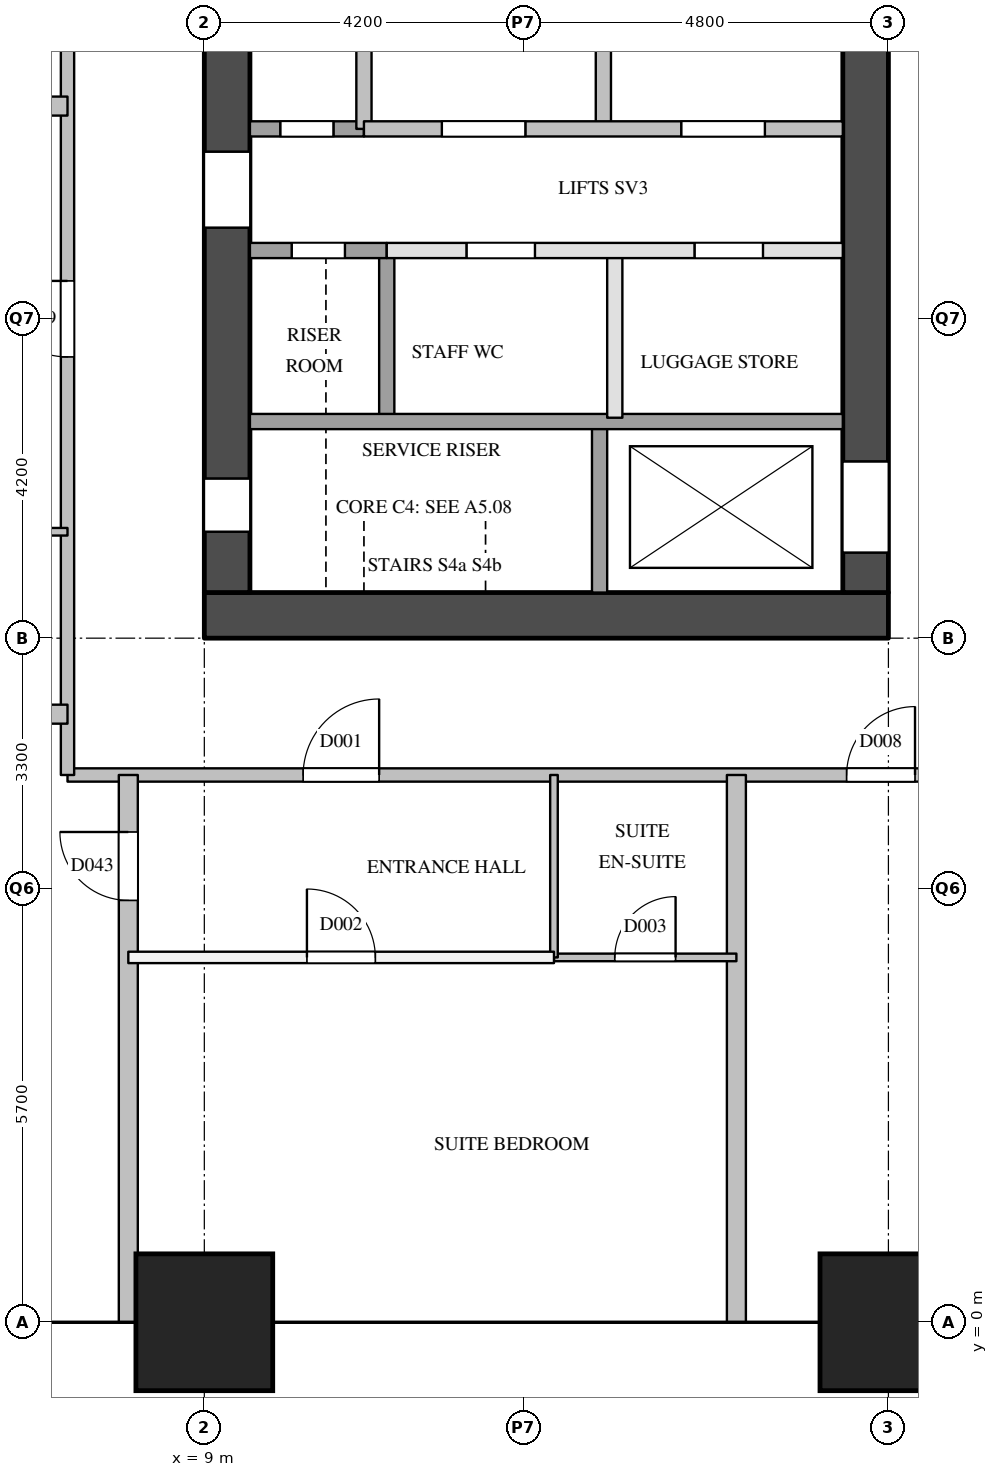
"""IFC4 building model, lengths in metres.
Left out: names, types, materials, properties, quantities, classifications, styles, units other than length and angle.
Written with IfcOpenShell. Run it as: python <this file> out.ifc"""

import sys

from ifc_helpers import new_model, si_unit, direction, frame, frame_2d, origin, origin_2d, place, context, subcontext, project, spatial, rectangle, extrude, element, fill, save


model = new_model("IFC4")
c1 = context("Model", 3, precision=1e-05, world=origin(), true_north=direction((0.0, 1.0)))
c2 = subcontext(c1, "Body", "Model", "MODEL_VIEW")
j1 = project(units=[si_unit("LENGTHUNIT", "METRE"), si_unit("PLANEANGLEUNIT", "RADIAN")], contexts=[c1])
p1 = place(None, origin())
s1 = spatial("IfcSite", under=j1, at=p1, CompositionType="ELEMENT")
p2 = place(p1, origin())
s2 = spatial("IfcBuilding", under=s1, at=p2, CompositionType="ELEMENT")
p3 = place(p2, frame((0.0, 0.0, 34.8)))
s3 = spatial("IfcBuildingStorey", under=s2, at=p3, CompositionType="ELEMENT", Elevation=34.8)
for number, where, z_axis, x_axis in (
    (1, (9.0, 0.0, 0.0), (0.0, 0.0, 1.0), (1.0, 0.0, 0.0)),
    (2, (18.0, 0.0, 0.0), (0.0, 0.0, 1.0), (1.0, 0.0, 0.0)),
):
    element("IfcColumn", number, at=place(p3, frame(where, z_axis=z_axis, x_axis=x_axis)), inside=s3, PredefinedType="COLUMN", context=c2, shape_type="SweptSolid", body=[
        extrude(rectangle(XDim=1.8, YDim=1.8, at=origin_2d()), origin(), (0.0, 0.0, 1.0), 3.8),
    ])
p4 = place(p3, frame((9.0, 9.3, 0.0), z_axis=(0.0, 0.0, 1.0), x_axis=(1.0, 0.0, 0.0)))
e3 = element("IfcWall", 3, at=p4, inside=s3, PredefinedType="SHEAR", context=c2, shape_type="SweptSolid", body=[
    extrude(rectangle(XDim=9.0, YDim=0.6, at=frame_2d((4.5, 0.0))), origin(), (0.0, 0.0, 1.0), 3.5),
])
p5 = place(p3, frame((9.3, 9.6, 0.0), z_axis=(0.0, 0.0, 1.0), x_axis=(0.0, 1.0, 0.0)))
e4 = element("IfcWall", 4, at=p5, inside=s3, PredefinedType="SHEAR", context=c2, shape_type="SweptSolid", body=[
    extrude(rectangle(XDim=12.3, YDim=0.6, at=frame_2d((6.15, 0.0))), origin(), (0.0, 0.0, 1.0), 3.5),
])
p6 = place(p5, frame((0.8, 0.0, 0.0)))
e5 = element("IfcOpeningElement", 5, at=p6, cuts=e4, PredefinedType="OPENING", context=c2, shape_type="SweptSolid", body=[
    extrude(rectangle(XDim=0.7, YDim=2.1, at=frame_2d((0.35, 1.05))), frame((0.0, 0.31, 0.0), z_axis=(0.0, -1.0, 0.0), x_axis=(1.0, 0.0, 0.0)), (0.0, 0.0, 1.0), 0.62),
])
p7 = place(p5, frame((4.8, 0.0, 0.0)))
e6 = element("IfcOpeningElement", 6, at=p7, cuts=e4, PredefinedType="OPENING", context=c2, shape_type="SweptSolid", body=[
    extrude(rectangle(XDim=1.0, YDim=2.1, at=frame_2d((0.5, 1.05))), frame((0.0, 0.31, 0.0), z_axis=(0.0, -1.0, 0.0), x_axis=(1.0, 0.0, 0.0)), (0.0, 0.0, 1.0), 0.62),
])
p8 = place(p3, frame((17.7, 9.6, 0.0), z_axis=(0.0, 0.0, 1.0), x_axis=(0.0, 1.0, 0.0)))
e7 = element("IfcWall", 7, at=p8, inside=s3, PredefinedType="SHEAR", context=c2, shape_type="SweptSolid", body=[
    extrude(rectangle(XDim=12.3, YDim=0.6, at=frame_2d((6.15, 0.0))), origin(), (0.0, 0.0, 1.0), 3.5),
])
p9 = place(p8, frame((0.525, 0.0, 0.0)))
e8 = element("IfcOpeningElement", 8, at=p9, cuts=e7, PredefinedType="OPENING", context=c2, shape_type="SweptSolid", body=[
    extrude(rectangle(XDim=1.2, YDim=2.1, at=frame_2d((0.6, 1.05))), frame((0.0, 0.31, 0.0), z_axis=(0.0, -1.0, 0.0), x_axis=(1.0, 0.0, 0.0)), (0.0, 0.0, 1.0), 0.62),
])
p10 = place(p3, frame((11.1, 15.7, 0.0), z_axis=(0.0, 0.0, 1.0), x_axis=(0.0, 1.0, 0.0)))
e9 = element("IfcWall", 9, at=p10, inside=s3, PredefinedType="SOLIDWALL", context=c2, shape_type="SweptSolid", body=[
    extrude(rectangle(XDim=4.3, YDim=0.2, at=frame_2d((2.15, 0.0))), origin(), (0.0, 0.0, 1.0), 3.5),
])
p11 = place(p3, frame((11.4, 11.9, 0.0), z_axis=(0.0, 0.0, 1.0), x_axis=(0.0, 1.0, 0.0)))
e10 = element("IfcWall", 10, at=p11, inside=s3, PredefinedType="SOLIDWALL", context=c2, shape_type="SweptSolid", body=[
    extrude(rectangle(XDim=2.2, YDim=0.2, at=frame_2d((1.1, 0.0))), origin(), (0.0, 0.0, 1.0), 3.5),
])
p12 = place(p3, frame((14.2, 9.6, 0.0), z_axis=(0.0, 0.0, 1.0), x_axis=(0.0, 1.0, 0.0)))
e11 = element("IfcWall", 11, at=p12, inside=s3, PredefinedType="SOLIDWALL", context=c2, shape_type="SweptSolid", body=[
    extrude(rectangle(XDim=2.3, YDim=0.2, at=frame_2d((1.15, 0.0))), origin(), (0.0, 0.0, 1.0), 3.5),
])
p13 = place(p3, frame((14.25, 15.7, 0.0), z_axis=(0.0, 0.0, 1.0), x_axis=(0.0, 1.0, 0.0)))
e12 = element("IfcWall", 12, at=p13, inside=s3, PredefinedType="SOLIDWALL", context=c2, shape_type="SweptSolid", body=[
    extrude(rectangle(XDim=4.3, YDim=0.2, at=frame_2d((2.15, 0.0))), origin(), (0.0, 0.0, 1.0), 3.5),
])
p14 = place(p3, frame((14.4, 11.9, 0.0), z_axis=(0.0, 0.0, 1.0), x_axis=(0.0, 1.0, 0.0)))
e13 = element("IfcWall", 13, at=p14, inside=s3, PredefinedType="PARTITIONING", context=c2, shape_type="SweptSolid", body=[
    extrude(rectangle(XDim=2.2, YDim=0.2, at=frame_2d((1.1, 0.0))), origin(), (0.0, 0.0, 1.0), 3.5),
])
p15 = place(p3, frame((9.6, 11.85, 0.0), z_axis=(0.0, 0.0, 1.0), x_axis=(1.0, 0.0, 0.0)))
e14 = element("IfcWall", 14, at=p15, inside=s3, PredefinedType="SOLIDWALL", context=c2, shape_type="SweptSolid", body=[
    extrude(rectangle(XDim=7.8, YDim=0.2, at=frame_2d((3.9, 0.0))), origin(), (0.0, 0.0, 1.0), 3.5),
])
p16 = place(p3, frame((11.4, 14.1, 0.0), z_axis=(0.0, 0.0, 1.0), x_axis=(1.0, 0.0, 0.0)))
e15 = element("IfcWall", 15, at=p16, inside=s3, PredefinedType="PARTITIONING", context=c2, shape_type="SweptSolid", body=[
    extrude(rectangle(XDim=6.0, YDim=0.2, at=frame_2d((3.0, 0.0))), origin(), (0.0, 0.0, 1.0), 3.5),
])
p17 = place(p16, frame((1.05, 0.0, 0.0)))
e16 = element("IfcOpeningElement", 16, at=p17, cuts=e15, PredefinedType="OPENING", context=c2, shape_type="SweptSolid", body=[
    extrude(rectangle(XDim=0.9, YDim=2.1, at=frame_2d((0.45, 1.05))), frame((0.0, 0.11, 0.0), z_axis=(0.0, -1.0, 0.0), x_axis=(1.0, 0.0, 0.0)), (0.0, 0.0, 1.0), 0.22),
])
p18 = place(p16, frame((4.05, 0.0, 0.0)))
e17 = element("IfcOpeningElement", 17, at=p18, cuts=e15, PredefinedType="OPENING", context=c2, shape_type="SweptSolid", body=[
    extrude(rectangle(XDim=0.9, YDim=2.1, at=frame_2d((0.45, 1.05))), frame((0.0, 0.11, 0.0), z_axis=(0.0, -1.0, 0.0), x_axis=(1.0, 0.0, 0.0)), (0.0, 0.0, 1.0), 0.22),
])
p19 = place(p3, frame((9.6, 14.1, 0.0), z_axis=(0.0, 0.0, 1.0), x_axis=(1.0, 0.0, 0.0)))
e18 = element("IfcWall", 18, at=p19, inside=s3, PredefinedType="SOLIDWALL", context=c2, shape_type="SweptSolid", body=[
    extrude(rectangle(XDim=1.8, YDim=0.2, at=frame_2d((0.9, 0.0))), origin(), (0.0, 0.0, 1.0), 3.5),
])
p20 = place(p19, frame((0.55, 0.0, 0.0)))
e19 = element("IfcOpeningElement", 19, at=p20, cuts=e18, PredefinedType="OPENING", context=c2, shape_type="SweptSolid", body=[
    extrude(rectangle(XDim=0.7, YDim=2.1, at=frame_2d((0.35, 1.05))), frame((0.0, 0.11, 0.0), z_axis=(0.0, -1.0, 0.0), x_axis=(1.0, 0.0, 0.0)), (0.0, 0.0, 1.0), 0.22),
])
p21 = place(p3, frame((9.6, 15.7, 0.0), z_axis=(0.0, 0.0, 1.0), x_axis=(1.0, 0.0, 0.0)))
e20 = element("IfcWall", 20, at=p21, inside=s3, PredefinedType="SOLIDWALL", context=c2, shape_type="SweptSolid", body=[
    extrude(rectangle(XDim=1.5, YDim=0.2, at=frame_2d((0.75, 0.0))), origin(), (0.0, 0.0, 1.0), 3.5),
])
p22 = place(p21, frame((0.4, 0.0, 0.0)))
e21 = element("IfcOpeningElement", 21, at=p22, cuts=e20, PredefinedType="OPENING", context=c2, shape_type="SweptSolid", body=[
    extrude(rectangle(XDim=0.7, YDim=2.1, at=frame_2d((0.35, 1.05))), frame((0.0, 0.11, 0.0), z_axis=(0.0, -1.0, 0.0), x_axis=(1.0, 0.0, 0.0)), (0.0, 0.0, 1.0), 0.22),
])
p23 = place(p3, frame((11.1, 15.7, 0.0), z_axis=(0.0, 0.0, 1.0), x_axis=(1.0, 0.0, 0.0)))
e22 = element("IfcWall", 22, at=p23, inside=s3, PredefinedType="SOLIDWALL", context=c2, shape_type="SweptSolid", body=[
    extrude(rectangle(XDim=6.3, YDim=0.2, at=frame_2d((3.15, 0.0))), origin(), (0.0, 0.0, 1.0), 3.5),
])
p24 = place(p23, frame((4.175, 0.0, 0.0)))
e23 = element("IfcOpeningElement", 23, at=p24, cuts=e22, PredefinedType="OPENING", context=c2, shape_type="SweptSolid", body=[
    extrude(rectangle(XDim=1.1, YDim=2.1, at=frame_2d((0.55, 1.05))), frame((0.0, 0.11, 0.0), z_axis=(0.0, -1.0, 0.0), x_axis=(1.0, 0.0, 0.0)), (0.0, 0.0, 1.0), 0.22),
])
p25 = place(p23, frame((1.025, 0.0, 0.0)))
e24 = element("IfcOpeningElement", 24, at=p25, cuts=e22, PredefinedType="OPENING", context=c2, shape_type="SweptSolid", body=[
    extrude(rectangle(XDim=1.1, YDim=2.1, at=frame_2d((0.55, 1.05))), frame((0.0, 0.11, 0.0), z_axis=(0.0, -1.0, 0.0), x_axis=(1.0, 0.0, 0.0)), (0.0, 0.0, 1.0), 0.22),
])
p26 = place(p3, frame((7.2, 7.2, 0.0), z_axis=(0.0, 0.0, 1.0), x_axis=(1.0, 0.0, 0.0)))
e25 = element("IfcWall", 25, at=p26, inside=s3, PredefinedType="PARTITIONING", context=c2, shape_type="SweptSolid", body=[
    extrude(rectangle(XDim=12.6, YDim=0.175, at=frame_2d((6.3, 0.0))), origin(), (0.0, 0.0, 1.0), 3.5),
])
p27 = place(p26, frame((3.1, 0.0, 0.0)))
e26 = element("IfcOpeningElement", 26, at=p27, cuts=e25, PredefinedType="OPENING", context=c2, shape_type="SweptSolid", body=[
    extrude(rectangle(XDim=1.0, YDim=2.1, at=frame_2d((0.5, 1.05))), frame((0.0, 0.097, 0.0), z_axis=(0.0, -1.0, 0.0), x_axis=(1.0, 0.0, 0.0)), (0.0, 0.0, 1.0), 0.195),
])
p28 = place(p26, frame((10.25, 0.0, 0.0)))
e27 = element("IfcOpeningElement", 27, at=p28, cuts=e25, PredefinedType="OPENING", context=c2, shape_type="SweptSolid", body=[
    extrude(rectangle(XDim=0.9, YDim=2.1, at=frame_2d((0.45, 1.05))), frame((0.0, 0.097, 0.0), z_axis=(0.0, -1.0, 0.0), x_axis=(1.0, 0.0, 0.0)), (0.0, 0.0, 1.0), 0.195),
])
p29 = place(p3, frame((7.2, 7.2, 0.0), z_axis=(0.0, 0.0, 1.0), x_axis=(0.0, 1.0, 0.0)))
e28 = element("IfcWall", 28, at=p29, inside=s3, PredefinedType="PARTITIONING", context=c2, shape_type="SweptSolid", body=[
    extrude(rectangle(XDim=16.49, YDim=0.175, at=frame_2d((8.245, 0.0))), origin(), (0.0, 0.0, 1.0), 3.5),
])
p30 = place(p29, frame((5.5, 0.0, 0.0)))
e29 = element("IfcOpeningElement", 29, at=p30, cuts=e28, PredefinedType="OPENING", context=c2, shape_type="SweptSolid", body=[
    extrude(rectangle(XDim=1.0, YDim=2.1, at=frame_2d((0.5, 1.05))), frame((0.0, 0.097, 0.0), z_axis=(0.0, -1.0, 0.0), x_axis=(1.0, 0.0, 0.0)), (0.0, 0.0, 1.0), 0.195),
])
p31 = place(p29, frame((11.5, 0.0, 0.0)))
e30 = element("IfcOpeningElement", 30, at=p31, cuts=e28, PredefinedType="OPENING", context=c2, shape_type="SweptSolid", body=[
    extrude(rectangle(XDim=1.0, YDim=2.1, at=frame_2d((0.5, 1.05))), frame((0.0, 0.097, 0.0), z_axis=(0.0, -1.0, 0.0), x_axis=(1.0, 0.0, 0.0)), (0.0, 0.0, 1.0), 0.195),
])
p32 = place(p3, frame((8.0, 4.8, 0.0), z_axis=(0.0, 0.0, 1.0), x_axis=(1.0, 0.0, 0.0)))
e31 = element("IfcWall", 31, at=p32, inside=s3, PredefinedType="PARTITIONING", context=c2, shape_type="SweptSolid", body=[
    extrude(rectangle(XDim=5.6, YDim=0.15, at=frame_2d((2.8, 0.0))), origin(), (0.0, 0.0, 1.0), 3.5),
])
p33 = place(p32, frame((2.35, 0.0, 0.0)))
e32 = element("IfcOpeningElement", 32, at=p33, cuts=e31, PredefinedType="OPENING", context=c2, shape_type="SweptSolid", body=[
    extrude(rectangle(XDim=0.9, YDim=2.1, at=frame_2d((0.45, 1.05))), frame((0.0, 0.085, 0.0), z_axis=(0.0, -1.0, 0.0), x_axis=(1.0, 0.0, 0.0)), (0.0, 0.0, 1.0), 0.17),
])
for number, where, z_axis, x_axis in (
    (33, (0.0, 8.0, 0.0), (0.0, 0.0, 1.0), (1.0, 0.0, 0.0)),
    (34, (0.0, 16.0, 0.0), (0.0, 0.0, 1.0), (1.0, 0.0, 0.0)),
):
    element("IfcWall", number, at=place(p3, frame(where, z_axis=z_axis, x_axis=x_axis)), inside=s3, PredefinedType="PARTITIONING", context=c2, shape_type="SweptSolid", body=[
        extrude(rectangle(XDim=7.2, YDim=0.25, at=frame_2d((3.6, 0.0))), origin(), (0.0, 0.0, 1.0), 2.5),
    ])
p34 = place(p3, frame((8.0, 0.0, 0.0), z_axis=(0.0, 0.0, 1.0), x_axis=(0.0, 1.0, 0.0)))
e35 = element("IfcWall", 35, at=p34, inside=s3, PredefinedType="PARTITIONING", context=c2, shape_type="SweptSolid", body=[
    extrude(rectangle(XDim=7.2, YDim=0.25, at=frame_2d((3.6, 0.0))), origin(), (0.0, 0.0, 1.0), 2.5),
])
p35 = place(p34, frame((5.55, 0.0, 0.0)))
e36 = element("IfcOpeningElement", 36, at=p35, cuts=e35, PredefinedType="OPENING", context=c2, shape_type="SweptSolid", body=[
    extrude(rectangle(XDim=0.9, YDim=2.1, at=frame_2d((0.45, 1.05))), frame((0.0, 0.135, 0.0), z_axis=(0.0, -1.0, 0.0), x_axis=(1.0, 0.0, 0.0)), (0.0, 0.0, 1.0), 0.27),
])
p36 = place(p3, frame((16.0, 0.0, 0.0), z_axis=(0.0, 0.0, 1.0), x_axis=(0.0, 1.0, 0.0)))
e37 = element("IfcWall", 37, at=p36, inside=s3, PredefinedType="PARTITIONING", context=c2, shape_type="SweptSolid", body=[
    extrude(rectangle(XDim=7.2, YDim=0.25, at=frame_2d((3.6, 0.0))), origin(), (0.0, 0.0, 1.0), 2.5),
])
p37 = place(p3, frame((13.6, 4.8, 0.0), z_axis=(0.0, 0.0, 1.0), x_axis=(1.0, 0.0, 0.0)))
e38 = element("IfcWall", 38, at=p37, inside=s3, PredefinedType="PARTITIONING", context=c2, shape_type="SweptSolid", body=[
    extrude(rectangle(XDim=2.4, YDim=0.1, at=frame_2d((1.2, 0.0))), origin(), (0.0, 0.0, 1.0), 3.5),
])
p38 = place(p37, frame((0.8, 0.0, 0.0)))
e39 = element("IfcOpeningElement", 39, at=p38, cuts=e38, PredefinedType="OPENING", context=c2, shape_type="SweptSolid", body=[
    extrude(rectangle(XDim=0.8, YDim=2.1, at=frame_2d((0.4, 1.05))), frame((0.0, 0.06, 0.0), z_axis=(0.0, -1.0, 0.0), x_axis=(1.0, 0.0, 0.0)), (0.0, 0.0, 1.0), 0.12),
])
for number, where, z_axis, x_axis in (
    (40, (4.8, 10.4, 0.0), (0.0, 0.0, 1.0), (1.0, 0.0, 0.0)),
    (41, (13.6, 4.8, 0.0), (0.0, 0.0, 1.0), (0.0, 1.0, 0.0)),
):
    element("IfcWall", number, at=place(p3, frame(where, z_axis=z_axis, x_axis=x_axis)), inside=s3, PredefinedType="PARTITIONING", context=c2, shape_type="SweptSolid", body=[
        extrude(rectangle(XDim=2.4, YDim=0.1, at=frame_2d((1.2, 0.0))), origin(), (0.0, 0.0, 1.0), 3.5),
    ])
p39 = place(p9, origin())
e42 = element("IfcDoor", 42, at=p39, inside=s3, OperationType="SLIDING_TO_LEFT", PredefinedType="DOOR", context=c2, shape_type="SweptSolid", body=[
    extrude(rectangle(XDim=1.2, YDim=2.1, at=frame_2d((0.6, 1.05))), frame((0.0, 0.025, 0.0), z_axis=(0.0, -1.0, 0.0), x_axis=(1.0, 0.0, 0.0)), (0.0, 0.0, 1.0), 0.05),
])
fill(e8, e42)
p40 = place(p24, origin())
e43 = element("IfcDoor", 43, at=p40, inside=s3, OperationType="SINGLE_SWING_RIGHT", PredefinedType="DOOR", context=c2, shape_type="SweptSolid", body=[
    extrude(rectangle(XDim=1.1, YDim=2.1, at=frame_2d((0.55, 1.05))), frame((0.0, 0.025, 0.0), z_axis=(0.0, -1.0, 0.0), x_axis=(1.0, 0.0, 0.0)), (0.0, 0.0, 1.0), 0.05),
])
fill(e23, e43)
p41 = place(p25, origin())
e44 = element("IfcDoor", 44, at=p41, inside=s3, OperationType="SINGLE_SWING_LEFT", PredefinedType="DOOR", context=c2, shape_type="SweptSolid", body=[
    extrude(rectangle(XDim=1.1, YDim=2.1, at=frame_2d((0.55, 1.05))), frame((0.0, 0.025, 0.0), z_axis=(0.0, -1.0, 0.0), x_axis=(1.0, 0.0, 0.0)), (0.0, 0.0, 1.0), 0.05),
])
fill(e24, e44)
p42 = place(p22, origin())
e45 = element("IfcDoor", 45, at=p42, inside=s3, OperationType="SINGLE_SWING_LEFT", PredefinedType="DOOR", context=c2, shape_type="SweptSolid", body=[
    extrude(rectangle(XDim=0.7, YDim=2.1, at=frame_2d((0.35, 1.05))), frame((0.0, 0.025, 0.0), z_axis=(0.0, -1.0, 0.0), x_axis=(1.0, 0.0, 0.0)), (0.0, 0.0, 1.0), 0.05),
])
fill(e21, e45)
p43 = place(p20, origin())
e46 = element("IfcDoor", 46, at=p43, inside=s3, OperationType="SINGLE_SWING_LEFT", PredefinedType="DOOR", context=c2, shape_type="SweptSolid", body=[
    extrude(rectangle(XDim=0.7, YDim=2.1, at=frame_2d((0.35, 1.05))), frame((0.0, 0.025, 0.0), z_axis=(0.0, -1.0, 0.0), x_axis=(1.0, 0.0, 0.0)), (0.0, 0.0, 1.0), 0.05),
])
fill(e19, e46)
p44 = place(p6, origin())
e47 = element("IfcDoor", 47, at=p44, inside=s3, OperationType="SINGLE_SWING_LEFT", PredefinedType="DOOR", context=c2, shape_type="SweptSolid", body=[
    extrude(rectangle(XDim=0.7, YDim=2.1, at=frame_2d((0.35, 1.05))), frame((0.0, 0.025, 0.0), z_axis=(0.0, -1.0, 0.0), x_axis=(1.0, 0.0, 0.0)), (0.0, 0.0, 1.0), 0.05),
])
fill(e5, e47)
p45 = place(p7, origin())
e48 = element("IfcDoor", 48, at=p45, inside=s3, OperationType="SINGLE_SWING_LEFT", PredefinedType="DOOR", context=c2, shape_type="SweptSolid", body=[
    extrude(rectangle(XDim=1.0, YDim=2.1, at=frame_2d((0.5, 1.05))), frame((0.0, 0.025, 0.0), z_axis=(0.0, -1.0, 0.0), x_axis=(1.0, 0.0, 0.0)), (0.0, 0.0, 1.0), 0.05),
])
fill(e6, e48)
p46 = place(p17, origin())
e49 = element("IfcDoor", 49, at=p46, inside=s3, OperationType="SINGLE_SWING_LEFT", PredefinedType="DOOR", context=c2, shape_type="SweptSolid", body=[
    extrude(rectangle(XDim=0.9, YDim=2.1, at=frame_2d((0.45, 1.05))), frame((0.0, 0.025, 0.0), z_axis=(0.0, -1.0, 0.0), x_axis=(1.0, 0.0, 0.0)), (0.0, 0.0, 1.0), 0.05),
])
fill(e16, e49)
p47 = place(p18, origin())
e50 = element("IfcDoor", 50, at=p47, inside=s3, OperationType="SINGLE_SWING_RIGHT", PredefinedType="DOOR", context=c2, shape_type="SweptSolid", body=[
    extrude(rectangle(XDim=0.9, YDim=2.1, at=frame_2d((0.45, 1.05))), frame((0.0, 0.025, 0.0), z_axis=(0.0, -1.0, 0.0), x_axis=(1.0, 0.0, 0.0)), (0.0, 0.0, 1.0), 0.05),
])
fill(e17, e50)
p48 = place(p27, origin())
e51 = element("IfcDoor", 51, at=p48, inside=s3, OperationType="SINGLE_SWING_RIGHT", PredefinedType="DOOR", context=c2, shape_type="SweptSolid", body=[
    extrude(rectangle(XDim=1.0, YDim=2.1, at=frame_2d((0.5, 1.05))), frame((0.0, 0.025, 0.0), z_axis=(0.0, -1.0, 0.0), x_axis=(1.0, 0.0, 0.0)), (0.0, 0.0, 1.0), 0.05),
])
fill(e26, e51)
p49 = place(p33, origin())
e52 = element("IfcDoor", 52, at=p49, inside=s3, OperationType="SINGLE_SWING_LEFT", PredefinedType="DOOR", context=c2, shape_type="SweptSolid", body=[
    extrude(rectangle(XDim=0.9, YDim=2.1, at=frame_2d((0.45, 1.05))), frame((0.0, 0.025, 0.0), z_axis=(0.0, -1.0, 0.0), x_axis=(1.0, 0.0, 0.0)), (0.0, 0.0, 1.0), 0.05),
])
fill(e32, e52)
p50 = place(p38, origin())
e53 = element("IfcDoor", 53, at=p50, inside=s3, OperationType="SINGLE_SWING_RIGHT", PredefinedType="DOOR", context=c2, shape_type="SweptSolid", body=[
    extrude(rectangle(XDim=0.8, YDim=2.1, at=frame_2d((0.4, 1.05))), frame((0.0, 0.025, 0.0), z_axis=(0.0, -1.0, 0.0), x_axis=(1.0, 0.0, 0.0)), (0.0, 0.0, 1.0), 0.05),
])
fill(e39, e53)
p51 = place(p28, origin())
e54 = element("IfcDoor", 54, at=p51, inside=s3, OperationType="SINGLE_SWING_RIGHT", PredefinedType="DOOR", context=c2, shape_type="SweptSolid", body=[
    extrude(rectangle(XDim=0.9, YDim=2.1, at=frame_2d((0.45, 1.05))), frame((0.0, 0.025, 0.0), z_axis=(0.0, -1.0, 0.0), x_axis=(1.0, 0.0, 0.0)), (0.0, 0.0, 1.0), 0.05),
])
fill(e27, e54)
p52 = place(p30, origin())
e55 = element("IfcDoor", 55, at=p52, inside=s3, OperationType="SINGLE_SWING_RIGHT", PredefinedType="DOOR", context=c2, shape_type="SweptSolid", body=[
    extrude(rectangle(XDim=1.0, YDim=2.1, at=frame_2d((0.5, 1.05))), frame((0.0, 0.025, 0.0), z_axis=(0.0, -1.0, 0.0), x_axis=(1.0, 0.0, 0.0)), (0.0, 0.0, 1.0), 0.05),
])
fill(e29, e55)
p53 = place(p35, origin())
e56 = element("IfcDoor", 56, at=p53, inside=s3, OperationType="SINGLE_SWING_RIGHT", PredefinedType="DOOR", context=c2, shape_type="SweptSolid", body=[
    extrude(rectangle(XDim=0.9, YDim=2.1, at=frame_2d((0.45, 1.05))), frame((0.0, 0.025, 0.0), z_axis=(0.0, -1.0, 0.0), x_axis=(1.0, 0.0, 0.0)), (0.0, 0.0, 1.0), 0.05),
])
fill(e36, e56)
save(model, sys.argv[1])
